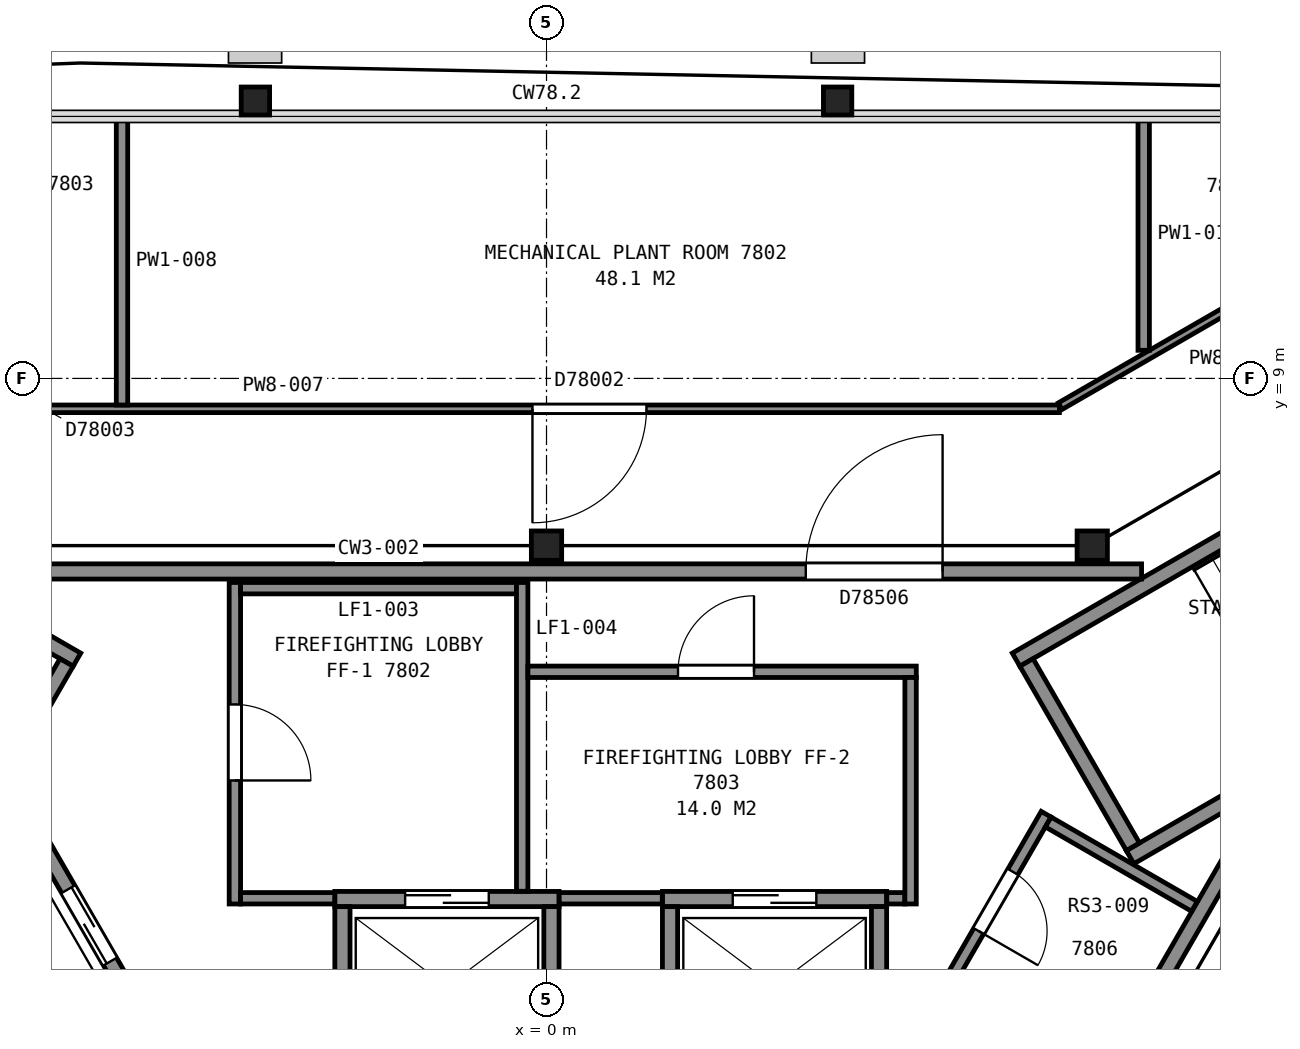
"""IFC4 building model, lengths in metres.
Left out: names, types, materials, properties, quantities, classifications, styles, units other than length and angle.
Written with IfcOpenShell. Run it as: python <this file> out.ifc"""

import sys

from ifc_helpers import new_model, si_unit, direction, frame, frame_2d, origin, origin_2d, place, context, subcontext, project, spatial, rectangle, i_section, extrude, element, fill, save


model = new_model("IFC4")
c1 = context("Model", 3, precision=1e-05, world=origin(), true_north=direction((0.0, 1.0)))
c2 = subcontext(c1, "Body", "Model", "MODEL_VIEW")
j1 = project(units=[si_unit("LENGTHUNIT", "METRE"), si_unit("PLANEANGLEUNIT", "RADIAN")], contexts=[c1])
p1 = place(None, origin())
s1 = spatial("IfcSite", under=j1, at=p1, CompositionType="ELEMENT")
p2 = place(p1, origin())
s2 = spatial("IfcBuilding", under=s1, at=p2, CompositionType="ELEMENT")
p3 = place(p2, frame((0.0, 0.0, 308.4)))
s3 = spatial("IfcBuildingStorey", under=s2, at=p3, CompositionType="ELEMENT", Elevation=308.4)
for number, where, z_axis, x_axis in (
    (1, (3.83, 12.65, 0.045), (0.0, 0.0, 1.0), (1.0, 0.0, 0.0)),
    (2, (-3.83, 12.65, 0.045), (0.0, 0.0, 1.0), (1.0, 0.0, 0.0)),
):
    element("IfcColumn", number, at=place(p3, frame(where, z_axis=z_axis, x_axis=x_axis)), inside=s3, PredefinedType="COLUMN", context=c2, shape_type="SweptSolid", body=[
        extrude(i_section(OverallWidth=0.373, OverallDepth=0.368, WebThickness=0.015, FlangeThickness=0.024, FilletRadius=0.015, at=origin_2d()), origin(), (0.0, 0.0, 1.0), 4.155),
    ])
for number, where, z_axis, x_axis in (
    (3, (7.18, 6.8, 0.0), (0.0, 0.0, 1.0), (1.0, 0.0, 0.0)),
    (4, (0.0, 6.8, 0.0), (0.0, 0.0, 1.0), (1.0, 0.0, 0.0)),
):
    element("IfcColumn", number, at=place(p3, frame(where, z_axis=z_axis, x_axis=x_axis)), inside=s3, PredefinedType="COLUMN", context=c2, shape_type="SweptSolid", body=[
        extrude(i_section(OverallWidth=0.399, OverallDepth=0.386, WebThickness=0.021, FlangeThickness=0.033, FilletRadius=0.015, at=origin_2d()), origin(), (0.0, 0.0, 1.0), 4.2),
    ])
for number, where, z_axis, x_axis in (
    (5, (6.178, 5.299, 0.0), (0.0, 0.0, 1.0), (0.866, 0.5, 0.0)),
    (6, (7.678, 2.701, 0.0), (0.0, 0.0, 1.0), (0.866, 0.5, 0.0)),
):
    element("IfcWall", number, at=place(p3, frame(where, z_axis=z_axis, x_axis=x_axis)), inside=s3, PredefinedType="PARTITIONING", context=c2, shape_type="SweptSolid", body=[
        extrude(rectangle(XDim=7.2, YDim=0.2, at=frame_2d((3.6, 0.0))), origin(), (0.0, 0.0, 1.0), 3.95),
    ])
p4 = place(p3, frame((7.715, 2.838, 0.0), z_axis=(0.0, 0.0, 1.0), x_axis=(-0.500049511043, 0.865996816683, 0.0)))
e7 = element("IfcWall", 7, at=p4, inside=s3, PredefinedType="PARTITIONING", context=c2, shape_type="SweptSolid", body=[
    extrude(rectangle(XDim=2.8, YDim=0.2, at=frame_2d((1.4, 0.0))), origin(), (0.0, 0.0, 1.0), 3.95),
])
p5 = place(p3, frame((-6.178, 5.299, 0.0), z_axis=(0.0, 0.0, 1.0), x_axis=(-0.866033125095, 0.499986626058, 0.0)))
e8 = element("IfcWall", 8, at=p5, inside=s3, PredefinedType="PARTITIONING", context=c2, shape_type="SweptSolid", body=[
    extrude(rectangle(XDim=7.2, YDim=0.2, at=frame_2d((3.6, 0.0))), origin(), (0.0, 0.0, 1.0), 3.95),
])
p6 = place(p3, frame((-6.315, 5.262, 0.0), z_axis=(0.0, 0.0, 1.0), x_axis=(-0.500049511043, -0.865996816683, 0.0)))
e9 = element("IfcWall", 9, at=p6, inside=s3, PredefinedType="PARTITIONING", context=c2, shape_type="SweptSolid", body=[
    extrude(rectangle(XDim=2.8, YDim=0.2, at=frame_2d((1.4, 0.0))), origin(), (0.0, 0.0, 1.0), 3.95),
])
p7 = place(p3, frame((-2.785, 2.15, 0.0), z_axis=(0.0, 0.0, 1.0), x_axis=(1.0, 0.0, 0.0)))
e10 = element("IfcWall", 10, at=p7, inside=s3, PredefinedType="PARTITIONING", context=c2, shape_type="SweptSolid", body=[
    extrude(rectangle(XDim=2.95, YDim=0.2, at=frame_2d((1.475, 0.0))), origin(), (0.0, 0.0, 1.0), 4.2),
])
p8 = place(p7, frame((0.925, 0.0, 0.0)))
e11 = element("IfcOpeningElement", 11, at=p8, cuts=e10, PredefinedType="OPENING", context=c2, shape_type="SweptSolid", body=[
    extrude(rectangle(XDim=1.1, YDim=2.1, at=frame_2d((0.55, 1.05))), frame((0.0, 0.11, 0.0), z_axis=(0.0, -1.0, 0.0), x_axis=(1.0, 0.0, 0.0)), (0.0, 0.0, 1.0), 0.22),
])
p9 = place(p3, frame((1.525, 2.15, 0.0), z_axis=(0.0, 0.0, 1.0), x_axis=(1.0, 0.0, 0.0)))
e12 = element("IfcWall", 12, at=p9, inside=s3, PredefinedType="PARTITIONING", context=c2, shape_type="SweptSolid", body=[
    extrude(rectangle(XDim=2.95, YDim=0.2, at=frame_2d((1.475, 0.0))), origin(), (0.0, 0.0, 1.0), 4.2),
])
p10 = place(p9, frame((0.925, 0.0, 0.0)))
e13 = element("IfcOpeningElement", 13, at=p10, cuts=e12, PredefinedType="OPENING", context=c2, shape_type="SweptSolid", body=[
    extrude(rectangle(XDim=1.1, YDim=2.1, at=frame_2d((0.55, 1.05))), frame((0.0, 0.11, 0.0), z_axis=(0.0, -1.0, 0.0), x_axis=(1.0, 0.0, 0.0)), (0.0, 0.0, 1.0), 0.22),
])
for number, where, z_axis, x_axis in (
    (14, (4.375, 0.1, 0.0), (0.0, 0.0, 1.0), (0.0, 1.0, 0.0)),
    (15, (1.625, 0.1, 0.0), (0.0, 0.0, 1.0), (0.0, 1.0, 0.0)),
    (16, (0.065, 0.1, 0.0), (0.0, 0.0, 1.0), (0.0, 1.0, 0.0)),
    (17, (-2.685, 0.1, 0.0), (0.0, 0.0, 1.0), (0.0, 1.0, 0.0)),
):
    element("IfcWall", number, at=place(p3, frame(where, z_axis=z_axis, x_axis=x_axis)), inside=s3, PredefinedType="PARTITIONING", context=c2, shape_type="SweptSolid", body=[
        extrude(rectangle(XDim=1.95, YDim=0.2, at=frame_2d((0.975, 0.0))), origin(), (0.0, 0.0, 1.0), 4.2),
    ])
p11 = place(p3, frame((-5.28, 0.525, 0.0), z_axis=(0.0, 0.0, 1.0), x_axis=(-0.500037662692, 0.866003658127, 0.0)))
e18 = element("IfcWall", 18, at=p11, inside=s3, PredefinedType="PARTITIONING", context=c2, shape_type="SweptSolid", body=[
    extrude(rectangle(XDim=2.95, YDim=0.2, at=frame_2d((1.475, 0.0))), origin(), (0.0, 0.0, 1.0), 4.2),
])
p12 = place(p11, frame((0.925, 0.0, 0.0)))
e19 = element("IfcOpeningElement", 19, at=p12, cuts=e18, PredefinedType="OPENING", context=c2, shape_type="SweptSolid", body=[
    extrude(rectangle(XDim=1.1, YDim=2.1, at=frame_2d((0.55, 1.05))), frame((0.0, 0.11, 0.0), z_axis=(0.0, -1.0, 0.0), x_axis=(1.0, 0.0, 0.0)), (0.0, 0.0, 1.0), 0.22),
])
p13 = place(p3, frame((7.829, 6.46, 0.0), z_axis=(0.0, 0.0, 1.0), x_axis=(-1.0, 0.0, 0.0)))
e20 = element("IfcWall", 20, at=p13, inside=s3, PredefinedType="PARTITIONING", context=c2, shape_type="SweptSolid", body=[
    extrude(rectangle(XDim=15.658, YDim=0.2, at=frame_2d((7.829, 0.0))), origin(), (0.0, 0.0, 1.0), 3.95),
])
p14 = place(p13, frame((2.618, 0.0, 0.0)))
e21 = element("IfcOpeningElement", 21, at=p14, cuts=e20, PredefinedType="OPENING", context=c2, shape_type="SweptSolid", body=[
    extrude(rectangle(XDim=1.8, YDim=2.1, at=frame_2d((0.9, 1.05))), frame((0.0, 0.11, 0.0), z_axis=(0.0, -1.0, 0.0), x_axis=(1.0, 0.0, 0.0)), (0.0, 0.0, 1.0), 0.22),
])
p15 = place(p3, frame((-4.1, 2.085, 0.0), z_axis=(0.0, 0.0, 1.0), x_axis=(0.0, 1.0, 0.0)))
e22 = element("IfcWall", 22, at=p15, inside=s3, PredefinedType="PARTITIONING", context=c2, shape_type="SweptSolid", body=[
    extrude(rectangle(XDim=4.23, YDim=0.15, at=frame_2d((2.115, 0.0))), origin(), (0.0, 0.0, 1.0), 3.95),
])
p16 = place(p15, frame((1.625, 0.0, 0.0)))
e23 = element("IfcOpeningElement", 23, at=p16, cuts=e22, PredefinedType="OPENING", context=c2, shape_type="SweptSolid", body=[
    extrude(rectangle(XDim=1.0, YDim=2.1, at=frame_2d((0.5, 1.05))), frame((0.0, 0.085, 0.0), z_axis=(0.0, -1.0, 0.0), x_axis=(1.0, 0.0, 0.0)), (0.0, 0.0, 1.0), 0.17),
])
p17 = place(p3, frame((-4.025, 2.16, 0.0), z_axis=(0.0, 0.0, 1.0), x_axis=(1.0, 0.0, 0.0)))
e24 = element("IfcWall", 24, at=p17, inside=s3, PredefinedType="PARTITIONING", context=c2, shape_type="SweptSolid", body=[
    extrude(rectangle(XDim=1.238, YDim=0.15, at=frame_2d((0.619, 0.0))), origin(), (0.0, 0.0, 1.0), 3.95),
])
p18 = place(p3, frame((-4.025, 6.24, 0.0), z_axis=(0.0, 0.0, 1.0), x_axis=(1.0, 0.0, 0.0)))
e25 = element("IfcWall", 25, at=p18, inside=s3, PredefinedType="PARTITIONING", context=c2, shape_type="SweptSolid", body=[
    extrude(rectangle(XDim=3.63, YDim=0.15, at=frame_2d((1.815, 0.0))), origin(), (0.0, 0.0, 1.0), 3.95),
])
p19 = place(p3, frame((-0.32, 2.252, 0.0), z_axis=(0.0, 0.0, 1.0), x_axis=(0.0, 1.0, 0.0)))
e26 = element("IfcWall", 26, at=p19, inside=s3, PredefinedType="PARTITIONING", context=c2, shape_type="SweptSolid", body=[
    extrude(rectangle(XDim=4.063, YDim=0.15, at=frame_2d((2.031, 0.0))), origin(), (0.0, 0.0, 1.0), 3.95),
])
p20 = place(p3, frame((-0.245, 5.14, 0.0), z_axis=(0.0, 0.0, 1.0), x_axis=(1.0, 0.0, 0.0)))
e27 = element("IfcWall", 27, at=p20, inside=s3, PredefinedType="PARTITIONING", context=c2, shape_type="SweptSolid", body=[
    extrude(rectangle(XDim=5.11, YDim=0.15, at=frame_2d((2.555, 0.0))), origin(), (0.0, 0.0, 1.0), 3.95),
])
p21 = place(p20, frame((1.975, 0.0, 0.0)))
e28 = element("IfcOpeningElement", 28, at=p21, cuts=e27, PredefinedType="OPENING", context=c2, shape_type="SweptSolid", body=[
    extrude(rectangle(XDim=1.0, YDim=2.1, at=frame_2d((0.5, 1.05))), frame((0.0, 0.085, 0.0), z_axis=(0.0, -1.0, 0.0), x_axis=(1.0, 0.0, 0.0)), (0.0, 0.0, 1.0), 0.17),
])
p22 = place(p3, frame((0.167, 2.16, 0.0), z_axis=(0.0, 0.0, 1.0), x_axis=(1.0, 0.0, 0.0)))
e29 = element("IfcWall", 29, at=p22, inside=s3, PredefinedType="PARTITIONING", context=c2, shape_type="SweptSolid", body=[
    extrude(rectangle(XDim=1.356, YDim=0.15, at=frame_2d((0.678, 0.0))), origin(), (0.0, 0.0, 1.0), 3.95),
])
p23 = place(p3, frame((3.828, -6.29, 0.0), z_axis=(0.0, 0.0, 1.0), x_axis=(0.499979739078, 0.866037101117, 0.0)))
e30 = element("IfcWall", 30, at=p23, inside=s3, PredefinedType="PARTITIONING", context=c2, shape_type="SweptSolid", body=[
    extrude(rectangle(XDim=11.363, YDim=0.2, at=frame_2d((5.681, 0.0))), origin(), (0.0, 0.0, 1.0), 3.95),
])
p24 = place(p3, frame((4.477, 2.16, 0.0), z_axis=(0.0, 0.0, 1.0), x_axis=(1.0, 0.0, 0.0)))
e31 = element("IfcWall", 31, at=p24, inside=s3, PredefinedType="PARTITIONING", context=c2, shape_type="SweptSolid", body=[
    extrude(rectangle(XDim=0.238, YDim=0.15, at=frame_2d((0.119, 0.0))), origin(), (0.0, 0.0, 1.0), 3.95),
])
p25 = place(p3, frame((4.79, 2.085, 0.0), z_axis=(0.0, 0.0, 1.0), x_axis=(0.0, 1.0, 0.0)))
e32 = element("IfcWall", 32, at=p25, inside=s3, PredefinedType="PARTITIONING", context=c2, shape_type="SweptSolid", body=[
    extrude(rectangle(XDim=2.98, YDim=0.15, at=frame_2d((1.49, 0.0))), origin(), (0.0, 0.0, 1.0), 3.95),
])
p26 = place(p3, frame((6.573, 3.266, 0.0), z_axis=(0.0, 0.0, 1.0), x_axis=(-0.499958106649, -0.866049589571, 0.0)))
e33 = element("IfcWall", 33, at=p26, inside=s3, PredefinedType="PARTITIONING", context=c2, shape_type="SweptSolid", body=[
    extrude(rectangle(XDim=2.75, YDim=0.15, at=frame_2d((1.375, 0.0))), origin(), (0.0, 0.0, 1.0), 3.95),
])
p27 = place(p26, frame((0.875, 0.0, 0.0)))
e34 = element("IfcOpeningElement", 34, at=p27, cuts=e33, PredefinedType="OPENING", context=c2, shape_type="SweptSolid", body=[
    extrude(rectangle(XDim=0.9, YDim=2.1, at=frame_2d((0.45, 1.05))), frame((0.0, 0.085, 0.0), z_axis=(0.0, -1.0, 0.0), x_axis=(1.0, 0.0, 0.0)), (0.0, 0.0, 1.0), 0.17),
])
p28 = place(p3, frame((6.601, 3.164, 0.0), z_axis=(0.0, 0.0, 1.0), x_axis=(0.866062920605, -0.499935013329, 0.0)))
e35 = element("IfcWall", 35, at=p28, inside=s3, PredefinedType="PARTITIONING", context=c2, shape_type="SweptSolid", body=[
    extrude(rectangle(XDim=2.22, YDim=0.15, at=frame_2d((1.11, 0.0))), origin(), (0.0, 0.0, 1.0), 3.95),
])
p29 = place(p3, frame((-4.075, -10.145, 0.0), z_axis=(0.0, 0.0, 1.0), x_axis=(-0.499912942625, 0.866075660549, 0.0)))
e36 = element("IfcWall", 36, at=p29, inside=s3, PredefinedType="PARTITIONING", context=c2, shape_type="SweptSolid", body=[
    extrude(rectangle(XDim=13.499, YDim=0.1, at=frame_2d((6.749, 0.0))), origin(), (0.0, 0.0, 1.0), 3.297),
])
p30 = place(p29, frame((6.548, 0.0, 0.0)))
e37 = element("IfcOpeningElement", 37, at=p30, cuts=e36, PredefinedType="OPENING", context=c2, shape_type="SweptSolid", body=[
    extrude(rectangle(XDim=1.5, YDim=2.1, at=frame_2d((0.75, 1.05))), frame((0.0, 0.06, 0.0), z_axis=(0.0, -1.0, 0.0), x_axis=(1.0, 0.0, 0.0)), (0.0, 0.0, 1.0), 0.12),
])
p31 = place(p3, frame((-6.748, 8.6, 0.0), z_axis=(0.0, 0.0, 1.0), x_axis=(1.0, 0.0, 0.0)))
e38 = element("IfcWall", 38, at=p31, inside=s3, PredefinedType="PARTITIONING", context=c2, shape_type="SweptSolid", body=[
    extrude(rectangle(XDim=13.496, YDim=0.1, at=frame_2d((6.748, 0.0))), origin(), (0.0, 0.0, 1.0), 3.297),
])
p32 = place(p31, frame((6.563, 0.0, 0.0)))
e39 = element("IfcOpeningElement", 39, at=p32, cuts=e38, PredefinedType="OPENING", context=c2, shape_type="SweptSolid", body=[
    extrude(rectangle(XDim=1.5, YDim=2.1, at=frame_2d((0.75, 1.05))), frame((0.0, 0.06, 0.0), z_axis=(0.0, -1.0, 0.0), x_axis=(1.0, 0.0, 0.0)), (0.0, 0.0, 1.0), 0.12),
])
p33 = place(p3, frame((-5.585, 8.65, 0.0), z_axis=(0.0, 0.0, 1.0), x_axis=(0.0, 1.0, 0.0)))
e40 = element("IfcWall", 40, at=p33, inside=s3, PredefinedType="PARTITIONING", context=c2, shape_type="SweptSolid", body=[
    extrude(rectangle(XDim=3.783, YDim=0.15, at=frame_2d((1.892, 0.0))), origin(), (0.0, 0.0, 1.0), 3.297),
])
p34 = place(p3, frame((10.823, 1.545, 0.0), z_axis=(0.0, 0.0, 1.0), x_axis=(-0.499912942625, -0.866075660549, 0.0)))
e41 = element("IfcWall", 41, at=p34, inside=s3, PredefinedType="PARTITIONING", context=c2, shape_type="SweptSolid", body=[
    extrude(rectangle(XDim=13.499, YDim=0.1, at=frame_2d((6.749, 0.0))), origin(), (0.0, 0.0, 1.0), 3.297),
])
p35 = place(p34, frame((4.119, 0.0, 0.0)))
e42 = element("IfcOpeningElement", 42, at=p35, cuts=e41, PredefinedType="OPENING", context=c2, shape_type="SweptSolid", body=[
    extrude(rectangle(XDim=1.5, YDim=2.1, at=frame_2d((0.75, 1.05))), frame((0.0, 0.06, 0.0), z_axis=(0.0, -1.0, 0.0), x_axis=(1.0, 0.0, 0.0)), (0.0, 0.0, 1.0), 0.12),
])
p36 = place(p3, frame((6.759, 8.635, 0.0), z_axis=(0.0, 0.0, 1.0), x_axis=(0.866073029218, 0.499917501255, 0.0)))
e43 = element("IfcWall", 43, at=p36, inside=s3, PredefinedType="PARTITIONING", context=c2, shape_type="SweptSolid", body=[
    extrude(rectangle(XDim=7.512, YDim=0.1, at=frame_2d((3.756, 0.0))), origin(), (0.0, 0.0, 1.0), 3.297),
])
p37 = place(p36, frame((3.868, 0.0, 0.0)))
e44 = element("IfcOpeningElement", 44, at=p37, cuts=e43, PredefinedType="OPENING", context=c2, shape_type="SweptSolid", body=[
    extrude(rectangle(XDim=0.9, YDim=2.1, at=frame_2d((0.45, 1.05))), frame((0.0, 0.06, 0.0), z_axis=(0.0, -1.0, 0.0), x_axis=(1.0, 0.0, 0.0)), (0.0, 0.0, 1.0), 0.12),
])
p38 = place(p3, frame((7.857, 9.37, 0.0), z_axis=(0.0, 0.0, 1.0), x_axis=(0.0, 1.0, 0.0)))
e45 = element("IfcWall", 45, at=p38, inside=s3, PredefinedType="PARTITIONING", context=c2, shape_type="SweptSolid", body=[
    extrude(rectangle(XDim=3.063, YDim=0.15, at=frame_2d((1.531, 0.0))), origin(), (0.0, 0.0, 1.0), 3.297),
])
p39 = place(p8, origin())
e46 = element("IfcDoor", 46, at=p39, inside=s3, OperationType="SLIDING_TO_LEFT", PredefinedType="DOOR", context=c2, shape_type="SweptSolid", body=[
    extrude(rectangle(XDim=1.1, YDim=2.1, at=frame_2d((0.55, 1.05))), frame((0.0, 0.025, 0.0), z_axis=(0.0, -1.0, 0.0), x_axis=(1.0, 0.0, 0.0)), (0.0, 0.0, 1.0), 0.05),
])
fill(e11, e46)
p40 = place(p10, origin())
e47 = element("IfcDoor", 47, at=p40, inside=s3, OperationType="SLIDING_TO_RIGHT", PredefinedType="DOOR", context=c2, shape_type="SweptSolid", body=[
    extrude(rectangle(XDim=1.1, YDim=2.1, at=frame_2d((0.55, 1.05))), frame((0.0, 0.025, 0.0), z_axis=(0.0, -1.0, 0.0), x_axis=(1.0, 0.0, 0.0)), (0.0, 0.0, 1.0), 0.05),
])
fill(e13, e47)
p41 = place(p12, origin())
e48 = element("IfcDoor", 48, at=p41, inside=s3, OperationType="SLIDING_TO_LEFT", PredefinedType="DOOR", context=c2, shape_type="SweptSolid", body=[
    extrude(rectangle(XDim=1.1, YDim=2.1, at=frame_2d((0.55, 1.05))), frame((0.0, 0.025, 0.0), z_axis=(0.0, -1.0, 0.0), x_axis=(1.0, 0.0, 0.0)), (0.0, 0.0, 1.0), 0.05),
])
fill(e19, e48)
p42 = place(p14, origin())
e49 = element("IfcDoor", 49, at=p42, inside=s3, OperationType="DOUBLE_DOOR_SINGLE_SWING", PredefinedType="DOOR", context=c2, shape_type="SweptSolid", body=[
    extrude(rectangle(XDim=1.8, YDim=2.1, at=frame_2d((0.9, 1.05))), frame((0.0, 0.025, 0.0), z_axis=(0.0, -1.0, 0.0), x_axis=(1.0, 0.0, 0.0)), (0.0, 0.0, 1.0), 0.05),
])
fill(e21, e49)
p43 = place(p16, origin())
e50 = element("IfcDoor", 50, at=p43, inside=s3, OperationType="SINGLE_SWING_LEFT", PredefinedType="DOOR", context=c2, shape_type="SweptSolid", body=[
    extrude(rectangle(XDim=1.0, YDim=2.1, at=frame_2d((0.5, 1.05))), frame((0.0, 0.025, 0.0), z_axis=(0.0, -1.0, 0.0), x_axis=(1.0, 0.0, 0.0)), (0.0, 0.0, 1.0), 0.05),
])
fill(e23, e50)
p44 = place(p21, origin())
e51 = element("IfcDoor", 51, at=p44, inside=s3, OperationType="SINGLE_SWING_RIGHT", PredefinedType="DOOR", context=c2, shape_type="SweptSolid", body=[
    extrude(rectangle(XDim=1.0, YDim=2.1, at=frame_2d((0.5, 1.05))), frame((0.0, 0.025, 0.0), z_axis=(0.0, -1.0, 0.0), x_axis=(1.0, 0.0, 0.0)), (0.0, 0.0, 1.0), 0.05),
])
fill(e28, e51)
p45 = place(p27, origin())
e52 = element("IfcDoor", 52, at=p45, inside=s3, OperationType="SINGLE_SWING_RIGHT", PredefinedType="DOOR", context=c2, shape_type="SweptSolid", body=[
    extrude(rectangle(XDim=0.9, YDim=2.1, at=frame_2d((0.45, 1.05))), frame((0.0, 0.025, 0.0), z_axis=(0.0, -1.0, 0.0), x_axis=(1.0, 0.0, 0.0)), (0.0, 0.0, 1.0), 0.05),
])
fill(e34, e52)
p46 = place(p32, origin())
e53 = element("IfcDoor", 53, at=p46, inside=s3, OperationType="DOUBLE_DOOR_SINGLE_SWING", PredefinedType="DOOR", context=c2, shape_type="SweptSolid", body=[
    extrude(rectangle(XDim=1.5, YDim=2.1, at=frame_2d((0.75, 1.05))), frame((0.0, 0.025, 0.0), z_axis=(0.0, -1.0, 0.0), x_axis=(1.0, 0.0, 0.0)), (0.0, 0.0, 1.0), 0.05),
])
fill(e39, e53)
save(model, sys.argv[1])
